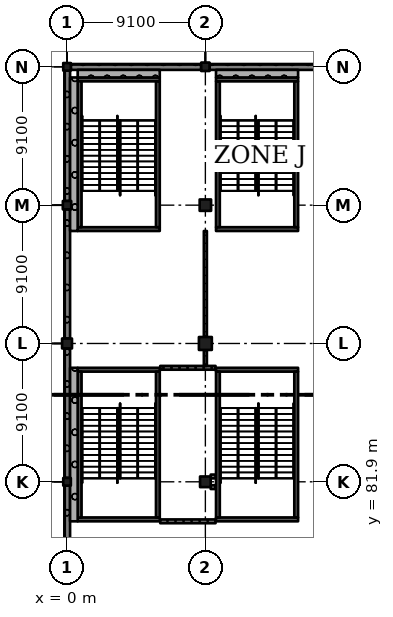
"""IFC4 building model, lengths in metres.
Left out: names, types, materials, properties, quantities, classifications, styles, units other than length and angle.
Written with IfcOpenShell. Run it as: python <this file> out.ifc"""

import sys

from ifc_helpers import new_model, si_unit, direction, frame, frame_2d, origin, origin_2d, place, context, subcontext, project, spatial, rectangle, extrude, element, fill, save


model = new_model("IFC4")
c1 = context("Model", 3, precision=1e-05, world=origin(), true_north=direction((0.0, 1.0)))
c2 = subcontext(c1, "Body", "Model", "MODEL_VIEW")
j1 = project(units=[si_unit("LENGTHUNIT", "METRE"), si_unit("PLANEANGLEUNIT", "RADIAN")], contexts=[c1])
p1 = place(None, origin())
s1 = spatial("IfcSite", under=j1, at=p1, CompositionType="ELEMENT")
p2 = place(p1, origin())
s2 = spatial("IfcBuilding", under=s1, at=p2, CompositionType="ELEMENT")
p3 = place(p2, origin())
s3 = spatial("IfcBuildingStorey", under=s2, at=p3, CompositionType="ELEMENT", Elevation=0.0)
p4 = place(p3, frame((0.0, 81.9, -0.4), z_axis=(0.0, 0.0, 1.0), x_axis=(1.0, 0.0, 0.0)))
e1 = element("IfcColumn", 1, at=p4, inside=s3, PredefinedType="COLUMN", context=c2, shape_type="SweptSolid", body=[
    extrude(rectangle(XDim=0.5, YDim=0.5, at=origin_2d()), origin(), (0.0, 0.0, 1.0), 6.77),
])
p5 = place(p3, frame((0.0, 91.0, -0.4), z_axis=(0.0, 0.0, 1.0), x_axis=(1.0, 0.0, 0.0)))
e2 = element("IfcColumn", 2, at=p5, inside=s3, PredefinedType="COLUMN", context=c2, shape_type="SweptSolid", body=[
    extrude(rectangle(XDim=0.65, YDim=0.65, at=origin_2d()), origin(), (0.0, 0.0, 1.0), 6.77),
])
p6 = place(p3, frame((0.0, 100.1, -0.4), z_axis=(0.0, 0.0, 1.0), x_axis=(1.0, 0.0, 0.0)))
e3 = element("IfcColumn", 3, at=p6, inside=s3, PredefinedType="COLUMN", context=c2, shape_type="SweptSolid", body=[
    extrude(rectangle(XDim=0.55, YDim=0.55, at=origin_2d()), origin(), (0.0, 0.0, 1.0), 6.77),
])
p7 = place(p3, frame((0.0, 109.2, -0.4), z_axis=(0.0, 0.0, 1.0), x_axis=(1.0, 0.0, 0.0)))
e4 = element("IfcColumn", 4, at=p7, inside=s3, PredefinedType="COLUMN", context=c2, shape_type="SweptSolid", body=[
    extrude(rectangle(XDim=0.5, YDim=0.5, at=origin_2d()), origin(), (0.0, 0.0, 1.0), 6.77),
])
p8 = place(p3, frame((9.1, 81.9, -0.4), z_axis=(0.0, 0.0, 1.0), x_axis=(1.0, 0.0, 0.0)))
e5 = element("IfcColumn", 5, at=p8, inside=s3, PredefinedType="COLUMN", context=c2, shape_type="SweptSolid", body=[
    extrude(rectangle(XDim=0.7, YDim=0.7, at=origin_2d()), origin(), (0.0, 0.0, 1.0), 6.77),
])
p9 = place(p3, frame((9.1, 91.0, -0.4), z_axis=(0.0, 0.0, 1.0), x_axis=(1.0, 0.0, 0.0)))
e6 = element("IfcColumn", 6, at=p9, inside=s3, PredefinedType="COLUMN", context=c2, shape_type="SweptSolid", body=[
    extrude(rectangle(XDim=0.85, YDim=0.85, at=origin_2d()), origin(), (0.0, 0.0, 1.0), 6.77),
])
p10 = place(p3, frame((9.1, 100.1, -0.4), z_axis=(0.0, 0.0, 1.0), x_axis=(1.0, 0.0, 0.0)))
e7 = element("IfcColumn", 7, at=p10, inside=s3, PredefinedType="COLUMN", context=c2, shape_type="SweptSolid", body=[
    extrude(rectangle(XDim=0.75, YDim=0.75, at=origin_2d()), origin(), (0.0, 0.0, 1.0), 6.77),
])
p11 = place(p3, frame((9.1, 109.2, -0.4), z_axis=(0.0, 0.0, 1.0), x_axis=(1.0, 0.0, 0.0)))
e8 = element("IfcColumn", 8, at=p11, inside=s3, PredefinedType="COLUMN", context=c2, shape_type="SweptSolid", body=[
    extrude(rectangle(XDim=0.55, YDim=0.55, at=origin_2d()), origin(), (0.0, 0.0, 1.0), 6.77),
])
p12 = place(p3, frame((6.1, 98.525, -0.4), z_axis=(0.0, 0.0, 1.0), x_axis=(-1.0, 0.0, 0.0)))
e9 = element("IfcWall", 9, at=p12, inside=s3, PredefinedType="SHEAR", context=c2, shape_type="SweptSolid", body=[
    extrude(rectangle(XDim=5.4, YDim=0.25, at=frame_2d((2.7, 0.0))), origin(), (0.0, 0.0, 1.0), 6.77),
])
p13 = place(p12, frame((1.5, 0.0, 0.4)))
e10 = element("IfcOpeningElement", 10, at=p13, cuts=e9, PredefinedType="OPENING", context=c2, shape_type="SweptSolid", body=[
    extrude(rectangle(XDim=2.4, YDim=2.1, at=frame_2d((1.2, 1.05))), frame((0.0, 0.135, 0.0), z_axis=(0.0, -1.0, 0.0), x_axis=(1.0, 0.0, 0.0)), (0.0, 0.0, 1.0), 0.27),
])
p14 = place(p3, frame((6.1, 108.375, -0.4), z_axis=(0.0, 0.0, 1.0), x_axis=(-1.0, 0.0, 0.0)))
e11 = element("IfcWall", 11, at=p14, inside=s3, PredefinedType="SHEAR", context=c2, shape_type="SweptSolid", body=[
    extrude(rectangle(XDim=5.4, YDim=0.25, at=frame_2d((2.7, 0.0))), origin(), (0.0, 0.0, 1.0), 6.77),
])
p15 = place(p3, frame((0.825, 108.25, -0.4), z_axis=(0.0, 0.0, 1.0), x_axis=(0.0, -1.0, 0.0)))
e12 = element("IfcWall", 12, at=p15, inside=s3, PredefinedType="SHEAR", context=c2, shape_type="SweptSolid", body=[
    extrude(rectangle(XDim=9.6, YDim=0.25, at=frame_2d((4.8, 0.0))), origin(), (0.0, 0.0, 1.0), 6.77),
])
p16 = place(p3, frame((5.975, 108.25, -0.4), z_axis=(0.0, 0.0, 1.0), x_axis=(0.0, -1.0, 0.0)))
e13 = element("IfcWall", 13, at=p16, inside=s3, PredefinedType="SHEAR", context=c2, shape_type="SweptSolid", body=[
    extrude(rectangle(XDim=9.6, YDim=0.25, at=frame_2d((4.8, 0.0))), origin(), (0.0, 0.0, 1.0), 6.77),
])
p17 = place(p16, frame((7.95, 0.0, 0.4)))
e14 = element("IfcOpeningElement", 14, at=p17, cuts=e13, PredefinedType="OPENING", context=c2, shape_type="SweptSolid", body=[
    extrude(rectangle(XDim=1.2, YDim=2.1, at=frame_2d((0.6, 1.05))), frame((0.0, 0.135, 0.0), z_axis=(0.0, -1.0, 0.0), x_axis=(1.0, 0.0, 0.0)), (0.0, 0.0, 1.0), 0.27),
])
p18 = place(p3, frame((15.2, 98.525, -0.4), z_axis=(0.0, 0.0, 1.0), x_axis=(-1.0, 0.0, 0.0)))
e15 = element("IfcWall", 15, at=p18, inside=s3, PredefinedType="SHEAR", context=c2, shape_type="SweptSolid", body=[
    extrude(rectangle(XDim=5.4, YDim=0.25, at=frame_2d((2.7, 0.0))), origin(), (0.0, 0.0, 1.0), 6.77),
])
p19 = place(p18, frame((1.5, 0.0, 0.4)))
e16 = element("IfcOpeningElement", 16, at=p19, cuts=e15, PredefinedType="OPENING", context=c2, shape_type="SweptSolid", body=[
    extrude(rectangle(XDim=2.4, YDim=2.1, at=frame_2d((1.2, 1.05))), frame((0.0, 0.135, 0.0), z_axis=(0.0, -1.0, 0.0), x_axis=(1.0, 0.0, 0.0)), (0.0, 0.0, 1.0), 0.27),
])
p20 = place(p3, frame((15.2, 108.375, -0.4), z_axis=(0.0, 0.0, 1.0), x_axis=(-1.0, 0.0, 0.0)))
e17 = element("IfcWall", 17, at=p20, inside=s3, PredefinedType="SHEAR", context=c2, shape_type="SweptSolid", body=[
    extrude(rectangle(XDim=5.4, YDim=0.25, at=frame_2d((2.7, 0.0))), origin(), (0.0, 0.0, 1.0), 6.77),
])
p21 = place(p3, frame((9.925, 108.25, -0.4), z_axis=(0.0, 0.0, 1.0), x_axis=(0.0, -1.0, 0.0)))
e18 = element("IfcWall", 18, at=p21, inside=s3, PredefinedType="SHEAR", context=c2, shape_type="SweptSolid", body=[
    extrude(rectangle(XDim=9.6, YDim=0.25, at=frame_2d((4.8, 0.0))), origin(), (0.0, 0.0, 1.0), 6.77),
])
p22 = place(p3, frame((15.075, 108.25, -0.4), z_axis=(0.0, 0.0, 1.0), x_axis=(0.0, -1.0, 0.0)))
e19 = element("IfcWall", 19, at=p22, inside=s3, PredefinedType="SHEAR", context=c2, shape_type="SweptSolid", body=[
    extrude(rectangle(XDim=9.6, YDim=0.25, at=frame_2d((4.8, 0.0))), origin(), (0.0, 0.0, 1.0), 6.77),
])
p23 = place(p22, frame((7.95, 0.0, 0.4)))
e20 = element("IfcOpeningElement", 20, at=p23, cuts=e19, PredefinedType="OPENING", context=c2, shape_type="SweptSolid", body=[
    extrude(rectangle(XDim=1.2, YDim=2.1, at=frame_2d((0.6, 1.05))), frame((0.0, 0.135, 0.0), z_axis=(0.0, -1.0, 0.0), x_axis=(1.0, 0.0, 0.0)), (0.0, 0.0, 1.0), 0.27),
])
p24 = place(p3, frame((6.1, 79.425, -0.4), z_axis=(0.0, 0.0, 1.0), x_axis=(-1.0, 0.0, 0.0)))
e21 = element("IfcWall", 21, at=p24, inside=s3, PredefinedType="SHEAR", context=c2, shape_type="SweptSolid", body=[
    extrude(rectangle(XDim=5.4, YDim=0.25, at=frame_2d((2.7, 0.0))), origin(), (0.0, 0.0, 1.0), 6.77),
])
p25 = place(p3, frame((6.1, 89.275, -0.4), z_axis=(0.0, 0.0, 1.0), x_axis=(-1.0, 0.0, 0.0)))
e22 = element("IfcWall", 22, at=p25, inside=s3, PredefinedType="SHEAR", context=c2, shape_type="SweptSolid", body=[
    extrude(rectangle(XDim=5.4, YDim=0.25, at=frame_2d((2.7, 0.0))), origin(), (0.0, 0.0, 1.0), 6.77),
])
p26 = place(p25, frame((1.5, 0.0, 0.4)))
e23 = element("IfcOpeningElement", 23, at=p26, cuts=e22, PredefinedType="OPENING", context=c2, shape_type="SweptSolid", body=[
    extrude(rectangle(XDim=2.4, YDim=2.1, at=frame_2d((1.2, 1.05))), frame((0.0, 0.135, 0.0), z_axis=(0.0, -1.0, 0.0), x_axis=(1.0, 0.0, 0.0)), (0.0, 0.0, 1.0), 0.27),
])
for number, where, z_axis, x_axis in (
    (24, (0.825, 89.15, -0.4), (0.0, 0.0, 1.0), (0.0, -1.0, 0.0)),
    (25, (5.975, 89.15, -0.4), (0.0, 0.0, 1.0), (0.0, -1.0, 0.0)),
):
    element("IfcWall", number, at=place(p3, frame(where, z_axis=z_axis, x_axis=x_axis)), inside=s3, PredefinedType="SHEAR", context=c2, shape_type="SweptSolid", body=[
        extrude(rectangle(XDim=9.6, YDim=0.25, at=frame_2d((4.8, 0.0))), origin(), (0.0, 0.0, 1.0), 6.77),
    ])
p27 = place(p3, frame((15.2, 79.425, -0.4), z_axis=(0.0, 0.0, 1.0), x_axis=(-1.0, 0.0, 0.0)))
e26 = element("IfcWall", 26, at=p27, inside=s3, PredefinedType="SHEAR", context=c2, shape_type="SweptSolid", body=[
    extrude(rectangle(XDim=5.4, YDim=0.25, at=frame_2d((2.7, 0.0))), origin(), (0.0, 0.0, 1.0), 6.77),
])
p28 = place(p3, frame((15.2, 89.275, -0.4), z_axis=(0.0, 0.0, 1.0), x_axis=(-1.0, 0.0, 0.0)))
e27 = element("IfcWall", 27, at=p28, inside=s3, PredefinedType="SHEAR", context=c2, shape_type="SweptSolid", body=[
    extrude(rectangle(XDim=5.4, YDim=0.25, at=frame_2d((2.7, 0.0))), origin(), (0.0, 0.0, 1.0), 6.77),
])
p29 = place(p28, frame((1.5, 0.0, 0.4)))
e28 = element("IfcOpeningElement", 28, at=p29, cuts=e27, PredefinedType="OPENING", context=c2, shape_type="SweptSolid", body=[
    extrude(rectangle(XDim=2.4, YDim=2.1, at=frame_2d((1.2, 1.05))), frame((0.0, 0.135, 0.0), z_axis=(0.0, -1.0, 0.0), x_axis=(1.0, 0.0, 0.0)), (0.0, 0.0, 1.0), 0.27),
])
for number, where, z_axis, x_axis in (
    (29, (9.925, 89.15, -0.4), (0.0, 0.0, 1.0), (0.0, -1.0, 0.0)),
    (30, (15.075, 89.15, -0.4), (0.0, 0.0, 1.0), (0.0, -1.0, 0.0)),
):
    element("IfcWall", number, at=place(p3, frame(where, z_axis=z_axis, x_axis=x_axis)), inside=s3, PredefinedType="SHEAR", context=c2, shape_type="SweptSolid", body=[
        extrude(rectangle(XDim=9.6, YDim=0.25, at=frame_2d((4.8, 0.0))), origin(), (0.0, 0.0, 1.0), 6.77),
    ])
p30 = place(p3, frame((17.925, 109.175, 0.0), z_axis=(0.0, 0.0, 1.0), x_axis=(-1.0, 0.0, 0.0)))
e31 = element("IfcWall", 31, at=p30, inside=s3, PredefinedType="SOLIDWALL", context=c2, shape_type="SweptSolid", body=[
    extrude(rectangle(XDim=8.55, YDim=0.35, at=frame_2d((4.275, 0.0))), origin(), (0.0, 0.0, 1.0), 5.27),
])
p31 = place(p30, frame((0.475, 0.0, 0.0)))
e32 = element("IfcOpeningElement", 32, at=p31, cuts=e31, PredefinedType="OPENING", context=c2, shape_type="SweptSolid", body=[
    extrude(rectangle(XDim=2.1, YDim=2.4, at=frame_2d((1.05, 1.2))), frame((0.0, 0.185, 0.0), z_axis=(0.0, -1.0, 0.0), x_axis=(1.0, 0.0, 0.0)), (0.0, 0.0, 1.0), 0.37),
])
p32 = place(p3, frame((8.825, 109.175, 0.0), z_axis=(0.0, 0.0, 1.0), x_axis=(-1.0, 0.0, 0.0)))
e33 = element("IfcWall", 33, at=p32, inside=s3, PredefinedType="SOLIDWALL", context=c2, shape_type="SweptSolid", body=[
    extrude(rectangle(XDim=8.575, YDim=0.35, at=frame_2d((4.288, 0.0))), origin(), (0.0, 0.0, 1.0), 5.27),
])
p33 = place(p32, frame((0.475, 0.0, 0.0)))
e34 = element("IfcOpeningElement", 34, at=p33, cuts=e33, PredefinedType="OPENING", context=c2, shape_type="SweptSolid", body=[
    extrude(rectangle(XDim=2.1, YDim=2.4, at=frame_2d((1.05, 1.2))), frame((0.0, 0.185, 0.0), z_axis=(0.0, -1.0, 0.0), x_axis=(1.0, 0.0, 0.0)), (0.0, 0.0, 1.0), 0.37),
])
p34 = place(p3, frame((0.025, 108.95, 0.0), z_axis=(0.0, 0.0, 1.0), x_axis=(0.0, -1.0, 0.0)))
e35 = element("IfcWall", 35, at=p34, inside=s3, PredefinedType="SOLIDWALL", context=c2, shape_type="SweptSolid", body=[
    extrude(rectangle(XDim=8.575, YDim=0.35, at=frame_2d((4.288, 0.0))), origin(), (0.0, 0.0, 1.0), 5.27),
])
p35 = place(p3, frame((0.025, 99.825, 0.0), z_axis=(0.0, 0.0, 1.0), x_axis=(0.0, -1.0, 0.0)))
e36 = element("IfcWall", 36, at=p35, inside=s3, PredefinedType="SOLIDWALL", context=c2, shape_type="SweptSolid", body=[
    extrude(rectangle(XDim=8.5, YDim=0.35, at=frame_2d((4.25, 0.0))), origin(), (0.0, 0.0, 1.0), 5.27),
])
p36 = place(p35, frame((1.625, 0.0, 0.0)))
e37 = element("IfcOpeningElement", 37, at=p36, cuts=e36, PredefinedType="OPENING", context=c2, shape_type="SweptSolid", body=[
    extrude(rectangle(XDim=2.4, YDim=2.4, at=frame_2d((1.2, 1.2))), frame((0.0, 0.185, 0.0), z_axis=(0.0, -1.0, 0.0), x_axis=(1.0, 0.0, 0.0)), (0.0, 0.0, 1.0), 0.37),
])
p37 = place(p35, frame((4.625, 0.0, 0.0)))
e38 = element("IfcOpeningElement", 38, at=p37, cuts=e36, PredefinedType="OPENING", context=c2, shape_type="SweptSolid", body=[
    extrude(rectangle(XDim=2.4, YDim=2.4, at=frame_2d((1.2, 1.2))), frame((0.0, 0.185, 0.0), z_axis=(0.0, -1.0, 0.0), x_axis=(1.0, 0.0, 0.0)), (0.0, 0.0, 1.0), 0.37),
])
p38 = place(p3, frame((0.025, 90.675, 0.0), z_axis=(0.0, 0.0, 1.0), x_axis=(0.0, -1.0, 0.0)))
e39 = element("IfcWall", 39, at=p38, inside=s3, PredefinedType="SOLIDWALL", context=c2, shape_type="SweptSolid", body=[
    extrude(rectangle(XDim=8.525, YDim=0.35, at=frame_2d((4.263, 0.0))), origin(), (0.0, 0.0, 1.0), 5.27),
])
p39 = place(p3, frame((0.025, 81.65, 0.0), z_axis=(0.0, 0.0, 1.0), x_axis=(0.0, -1.0, 0.0)))
e40 = element("IfcWall", 40, at=p39, inside=s3, PredefinedType="SOLIDWALL", context=c2, shape_type="SweptSolid", body=[
    extrude(rectangle(XDim=8.5, YDim=0.35, at=frame_2d((4.25, 0.0))), origin(), (0.0, 0.0, 1.0), 5.27),
])
p40 = place(p3, frame((0.7, 108.75, 0.0), z_axis=(0.0, 0.0, 1.0), x_axis=(1.0, 0.0, 0.0)))
e41 = element("IfcWall", 41, at=p40, inside=s3, PredefinedType="SOLIDWALL", context=c2, shape_type="SweptSolid", body=[
    extrude(rectangle(XDim=5.4, YDim=0.5, at=frame_2d((2.7, 0.0))), origin(), (0.0, 0.0, 1.0), 6.37),
])
p41 = place(p3, frame((0.45, 98.4, 0.0), z_axis=(0.0, 0.0, 1.0), x_axis=(0.0, 1.0, 0.0)))
e42 = element("IfcWall", 42, at=p41, inside=s3, PredefinedType="SOLIDWALL", context=c2, shape_type="SweptSolid", body=[
    extrude(rectangle(XDim=10.1, YDim=0.5, at=frame_2d((5.05, 0.0))), origin(), (0.0, 0.0, 1.0), 6.02),
])
p42 = place(p3, frame((9.8, 108.75, 0.0), z_axis=(0.0, 0.0, 1.0), x_axis=(1.0, 0.0, 0.0)))
e43 = element("IfcWall", 43, at=p42, inside=s3, PredefinedType="SOLIDWALL", context=c2, shape_type="SweptSolid", body=[
    extrude(rectangle(XDim=5.4, YDim=0.5, at=frame_2d((2.7, 0.0))), origin(), (0.0, 0.0, 1.0), 6.37),
])
p43 = place(p3, frame((0.45, 79.3, 0.0), z_axis=(0.0, 0.0, 1.0), x_axis=(0.0, 1.0, 0.0)))
e44 = element("IfcWall", 44, at=p43, inside=s3, PredefinedType="SOLIDWALL", context=c2, shape_type="SweptSolid", body=[
    extrude(rectangle(XDim=10.1, YDim=0.5, at=frame_2d((5.05, 0.0))), origin(), (0.0, 0.0, 1.0), 6.02),
])
p44 = place(p3, frame((6.13, 89.4, 0.0), z_axis=(0.0, 0.0, 1.0), x_axis=(1.0, 0.0, 0.0)))
e45 = element("IfcWall", 45, at=p44, inside=s3, PredefinedType="SOLIDWALL", context=c2, shape_type="SweptSolid", body=[
    extrude(rectangle(XDim=3.64, YDim=0.25, at=frame_2d((1.82, 0.0))), origin(), (0.0, 0.0, 1.0), 6.02),
])
p45 = place(p44, frame((1.02, 0.0, 0.0)))
e46 = element("IfcOpeningElement", 46, at=p45, cuts=e45, PredefinedType="OPENING", context=c2, shape_type="SweptSolid", body=[
    extrude(rectangle(XDim=1.0, YDim=2.1, at=frame_2d((0.5, 1.05))), frame((0.0, 0.135, 0.0), z_axis=(0.0, -1.0, 0.0), x_axis=(1.0, 0.0, 0.0)), (0.0, 0.0, 1.0), 0.27),
])
p46 = place(p3, frame((9.1, 90.575, 0.0), z_axis=(0.0, 0.0, 1.0), x_axis=(0.0, -1.0, 0.0)))
e47 = element("IfcWall", 47, at=p46, inside=s3, PredefinedType="PARTITIONING", context=c2, shape_type="SweptSolid", body=[
    extrude(rectangle(XDim=1.05, YDim=0.2, at=frame_2d((0.525, 0.0))), origin(), (0.0, 0.0, 1.0), 5.32),
])
p47 = place(p3, frame((9.1, 98.4, 0.0), z_axis=(0.0, 0.0, 1.0), x_axis=(0.0, -1.0, 0.0)))
e48 = element("IfcWall", 48, at=p47, inside=s3, PredefinedType="PARTITIONING", context=c2, shape_type="SweptSolid", body=[
    extrude(rectangle(XDim=6.975, YDim=0.2, at=frame_2d((3.487, 0.0))), origin(), (0.0, 0.0, 1.0), 5.32),
])
p48 = place(p47, frame((0.85, 0.0, 0.0)))
e49 = element("IfcOpeningElement", 49, at=p48, cuts=e48, PredefinedType="OPENING", context=c2, shape_type="SweptSolid", body=[
    extrude(rectangle(XDim=1.8, YDim=2.4, at=frame_2d((0.9, 1.2))), frame((0.0, 0.11, 0.0), z_axis=(0.0, -1.0, 0.0), x_axis=(1.0, 0.0, 0.0)), (0.0, 0.0, 1.0), 0.22),
])
p49 = place(p47, frame((4.35, 0.0, 0.0)))
e50 = element("IfcOpeningElement", 50, at=p49, cuts=e48, PredefinedType="OPENING", context=c2, shape_type="SweptSolid", body=[
    extrude(rectangle(XDim=1.8, YDim=2.4, at=frame_2d((0.9, 1.2))), frame((0.0, 0.11, 0.0), z_axis=(0.0, -1.0, 0.0), x_axis=(1.0, 0.0, 0.0)), (0.0, 0.0, 1.0), 0.22),
])
p50 = place(p3, frame((9.45, 81.55, 0.0), z_axis=(0.0, 0.0, 1.0), x_axis=(1.0, 0.0, 0.0)))
e51 = element("IfcWall", 51, at=p50, inside=s3, PredefinedType="SOLIDWALL", context=c2, shape_type="SweptSolid", body=[
    extrude(rectangle(XDim=0.32, YDim=0.25, at=frame_2d((0.16, 0.0))), origin(), (0.0, 0.0, 1.0), 6.02),
])
p51 = place(p3, frame((9.77, 79.3, 0.0), z_axis=(0.0, 0.0, 1.0), x_axis=(-1.0, 0.0, 0.0)))
e52 = element("IfcWall", 52, at=p51, inside=s3, PredefinedType="SOLIDWALL", context=c2, shape_type="SweptSolid", body=[
    extrude(rectangle(XDim=3.64, YDim=0.25, at=frame_2d((1.82, 0.0))), origin(), (0.0, 0.0, 1.0), 6.02),
])
p52 = place(p3, frame((9.77, 82.25, 0.0), z_axis=(0.0, 0.0, 1.0), x_axis=(-1.0, 0.0, 0.0)))
e53 = element("IfcWall", 53, at=p52, inside=s3, PredefinedType="SOLIDWALL", context=c2, shape_type="SweptSolid", body=[
    extrude(rectangle(XDim=0.32, YDim=0.25, at=frame_2d((0.16, 0.0))), origin(), (0.0, 0.0, 1.0), 6.02),
])
p53 = place(p31, frame((2.1, 0.0, 0.0), z_axis=(0.0, 0.0, 1.0), x_axis=(-1.0, 0.0, 0.0)))
e54 = element("IfcDoor", 54, at=p53, inside=s3, OperationType="DOUBLE_DOOR_SINGLE_SWING", PredefinedType="DOOR", context=c2, shape_type="SweptSolid", body=[
    extrude(rectangle(XDim=2.1, YDim=2.4, at=frame_2d((1.05, 1.2))), frame((0.0, 0.025, 0.0), z_axis=(0.0, -1.0, 0.0), x_axis=(1.0, 0.0, 0.0)), (0.0, 0.0, 1.0), 0.05),
])
fill(e32, e54)
p54 = place(p33, frame((2.1, 0.0, 0.0), z_axis=(0.0, 0.0, 1.0), x_axis=(-1.0, 0.0, 0.0)))
e55 = element("IfcDoor", 55, at=p54, inside=s3, OperationType="DOUBLE_DOOR_SINGLE_SWING", PredefinedType="DOOR", context=c2, shape_type="SweptSolid", body=[
    extrude(rectangle(XDim=2.1, YDim=2.4, at=frame_2d((1.05, 1.2))), frame((0.0, 0.025, 0.0), z_axis=(0.0, -1.0, 0.0), x_axis=(1.0, 0.0, 0.0)), (0.0, 0.0, 1.0), 0.05),
])
fill(e34, e55)
p55 = place(p36, frame((2.4, 0.0, 0.0), z_axis=(0.0, 0.0, 1.0), x_axis=(-1.0, 0.0, 0.0)))
e56 = element("IfcDoor", 56, at=p55, inside=s3, OperationType="DOUBLE_DOOR_SINGLE_SWING", PredefinedType="DOOR", context=c2, shape_type="SweptSolid", body=[
    extrude(rectangle(XDim=2.4, YDim=2.4, at=frame_2d((1.2, 1.2))), frame((0.0, 0.025, 0.0), z_axis=(0.0, -1.0, 0.0), x_axis=(1.0, 0.0, 0.0)), (0.0, 0.0, 1.0), 0.05),
])
fill(e37, e56)
p56 = place(p37, frame((2.4, 0.0, 0.0), z_axis=(0.0, 0.0, 1.0), x_axis=(-1.0, 0.0, 0.0)))
e57 = element("IfcDoor", 57, at=p56, inside=s3, OperationType="DOUBLE_DOOR_SINGLE_SWING", PredefinedType="DOOR", context=c2, shape_type="SweptSolid", body=[
    extrude(rectangle(XDim=2.4, YDim=2.4, at=frame_2d((1.2, 1.2))), frame((0.0, 0.025, 0.0), z_axis=(0.0, -1.0, 0.0), x_axis=(1.0, 0.0, 0.0)), (0.0, 0.0, 1.0), 0.05),
])
fill(e38, e57)
p57 = place(p45, origin())
e58 = element("IfcDoor", 58, at=p57, inside=s3, OperationType="SINGLE_SWING_RIGHT", PredefinedType="DOOR", context=c2, shape_type="SweptSolid", body=[
    extrude(rectangle(XDim=1.0, YDim=2.1, at=frame_2d((0.5, 1.05))), frame((0.0, 0.025, 0.0), z_axis=(0.0, -1.0, 0.0), x_axis=(1.0, 0.0, 0.0)), (0.0, 0.0, 1.0), 0.05),
])
fill(e46, e58)
p58 = place(p48, origin())
e59 = element("IfcDoor", 59, at=p58, inside=s3, OperationType="DOUBLE_DOOR_SINGLE_SWING", PredefinedType="DOOR", context=c2, shape_type="SweptSolid", body=[
    extrude(rectangle(XDim=1.8, YDim=2.4, at=frame_2d((0.9, 1.2))), frame((0.0, 0.025, 0.0), z_axis=(0.0, -1.0, 0.0), x_axis=(1.0, 0.0, 0.0)), (0.0, 0.0, 1.0), 0.05),
])
fill(e49, e59)
p59 = place(p49, origin())
e60 = element("IfcDoor", 60, at=p59, inside=s3, OperationType="DOUBLE_DOOR_SINGLE_SWING", PredefinedType="DOOR", context=c2, shape_type="SweptSolid", body=[
    extrude(rectangle(XDim=1.8, YDim=2.4, at=frame_2d((0.9, 1.2))), frame((0.0, 0.025, 0.0), z_axis=(0.0, -1.0, 0.0), x_axis=(1.0, 0.0, 0.0)), (0.0, 0.0, 1.0), 0.05),
])
fill(e50, e60)
p60 = place(p13, origin())
e61 = element("IfcDoor", 61, at=p60, inside=s3, OperationType="DOUBLE_DOOR_SINGLE_SWING", PredefinedType="DOOR", context=c2, shape_type="SweptSolid", body=[
    extrude(rectangle(XDim=2.4, YDim=2.1, at=frame_2d((1.2, 1.05))), frame((0.0, 0.025, 0.0), z_axis=(0.0, -1.0, 0.0), x_axis=(1.0, 0.0, 0.0)), (0.0, 0.0, 1.0), 0.05),
])
fill(e10, e61)
p61 = place(p19, origin())
e62 = element("IfcDoor", 62, at=p61, inside=s3, OperationType="DOUBLE_DOOR_SINGLE_SWING", PredefinedType="DOOR", context=c2, shape_type="SweptSolid", body=[
    extrude(rectangle(XDim=2.4, YDim=2.1, at=frame_2d((1.2, 1.05))), frame((0.0, 0.025, 0.0), z_axis=(0.0, -1.0, 0.0), x_axis=(1.0, 0.0, 0.0)), (0.0, 0.0, 1.0), 0.05),
])
fill(e16, e62)
p62 = place(p26, origin())
e63 = element("IfcDoor", 63, at=p62, inside=s3, OperationType="DOUBLE_DOOR_SINGLE_SWING", PredefinedType="DOOR", context=c2, shape_type="SweptSolid", body=[
    extrude(rectangle(XDim=2.4, YDim=2.1, at=frame_2d((1.2, 1.05))), frame((0.0, 0.025, 0.0), z_axis=(0.0, -1.0, 0.0), x_axis=(1.0, 0.0, 0.0)), (0.0, 0.0, 1.0), 0.05),
])
fill(e23, e63)
p63 = place(p29, origin())
e64 = element("IfcDoor", 64, at=p63, inside=s3, OperationType="DOUBLE_DOOR_SINGLE_SWING", PredefinedType="DOOR", context=c2, shape_type="SweptSolid", body=[
    extrude(rectangle(XDim=2.4, YDim=2.1, at=frame_2d((1.2, 1.05))), frame((0.0, 0.025, 0.0), z_axis=(0.0, -1.0, 0.0), x_axis=(1.0, 0.0, 0.0)), (0.0, 0.0, 1.0), 0.05),
])
fill(e28, e64)
p64 = place(p17, origin())
e65 = element("IfcDoor", 65, at=p64, inside=s3, OperationType="SINGLE_SWING_LEFT", PredefinedType="DOOR", context=c2, shape_type="SweptSolid", body=[
    extrude(rectangle(XDim=1.2, YDim=2.1, at=frame_2d((0.6, 1.05))), frame((0.0, 0.025, 0.0), z_axis=(0.0, -1.0, 0.0), x_axis=(1.0, 0.0, 0.0)), (0.0, 0.0, 1.0), 0.05),
])
fill(e14, e65)
p65 = place(p23, origin())
e66 = element("IfcDoor", 66, at=p65, inside=s3, OperationType="SINGLE_SWING_LEFT", PredefinedType="DOOR", context=c2, shape_type="SweptSolid", body=[
    extrude(rectangle(XDim=1.2, YDim=2.1, at=frame_2d((0.6, 1.05))), frame((0.0, 0.025, 0.0), z_axis=(0.0, -1.0, 0.0), x_axis=(1.0, 0.0, 0.0)), (0.0, 0.0, 1.0), 0.05),
])
fill(e20, e66)
save(model, sys.argv[1])
